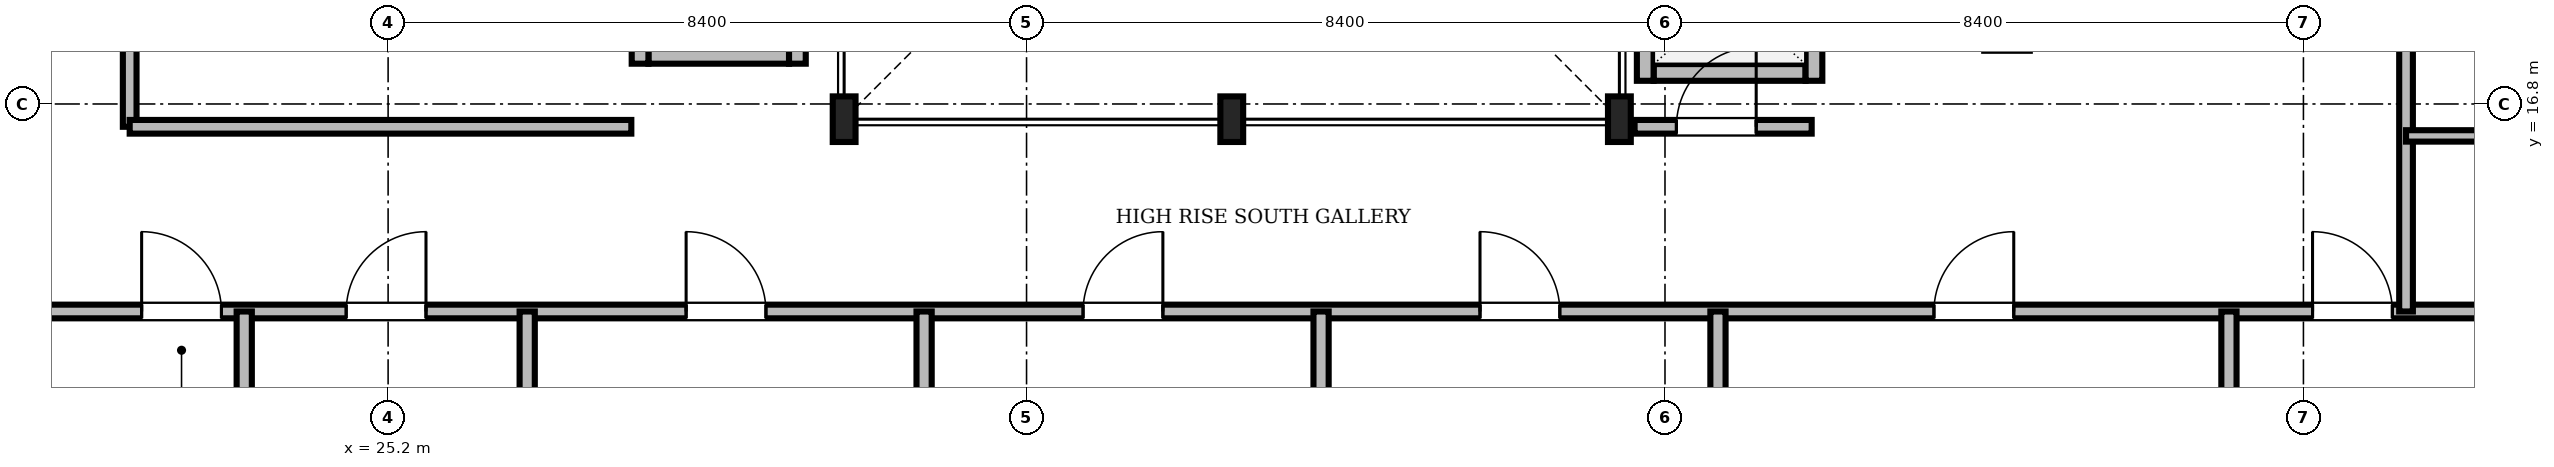
"""IFC4 building model, lengths in metres.
Left out: names, types, materials, properties, quantities, classifications, styles, units other than length and angle.
Written with IfcOpenShell. Run it as: python <this file> out.ifc"""

import sys

from ifc_helpers import new_model, si_unit, direction, frame, frame_2d, origin, origin_2d, place, context, subcontext, project, spatial, rectangle, i_section, extrude, source, transform, mapped, element, fill, save


model = new_model("IFC4")
c1 = context("Model", 3, precision=1e-05, world=origin(), true_north=direction((0.0, 1.0)))
c2 = subcontext(c1, "Body", "Model", "MODEL_VIEW")
j1 = project(units=[si_unit("LENGTHUNIT", "METRE"), si_unit("PLANEANGLEUNIT", "RADIAN")], contexts=[c1])
p1 = place(None, origin())
s1 = spatial("IfcSite", under=j1, at=p1, CompositionType="ELEMENT")
p2 = place(p1, origin())
s2 = spatial("IfcBuilding", under=s1, at=p2, CompositionType="ELEMENT")
p3 = place(p2, frame((0.0, 0.0, 262.45)))
s3 = spatial("IfcBuildingStorey", under=s2, at=p3, CompositionType="ELEMENT", Elevation=262.45)
m1 = source(origin(), c2, "Body", "SweptSolid", [
    extrude(i_section(OverallWidth=0.3, OverallDepth=0.6, WebThickness=0.015, FlangeThickness=0.03, FilletRadius=0.027, at=origin_2d()), origin(), (0.0, 0.0, 1.0), 3.65),
])
for number, where, z_axis, x_axis in (
    (1, (31.2, 16.6, 0.0), (0.0, 0.0, 1.0), (1.0, 0.0, 0.0)),
    (2, (36.3, 16.6, 0.0), (0.0, 0.0, 1.0), (1.0, 0.0, 0.0)),
    (3, (41.4, 16.6, 0.0), (0.0, 0.0, 1.0), (1.0, 0.0, 0.0)),
):
    element("IfcColumn", number, at=place(p3, frame(where, z_axis=z_axis, x_axis=x_axis)), inside=s3, PredefinedType="COLUMN", context=c2, shape_type="MappedRepresentation", body=[
        mapped(m1, transform((0.0, 0.0, 0.0), scale=1.0)),
    ])
m2 = source(origin(), c2, "Body", "SweptSolid", [
    extrude(rectangle(XDim=2.0, YDim=0.22, at=frame_2d((1.0, 0.0))), origin(), (0.0, 0.0, 1.0), 3.65),
])
p4 = place(p3, frame((41.85, 17.215, 0.0), z_axis=(0.0, 0.0, 1.0), x_axis=(1.0, 0.0, 0.0)))
e4 = element("IfcWall", 4, at=p4, inside=s3, PredefinedType="SOLIDWALL", context=c2, shape_type="MappedRepresentation", body=[
    mapped(m2, transform((0.0, 0.0, 0.0), scale=1.0)),
])
m3 = source(origin(), c2, "Body", "SweptSolid", [
    extrude(rectangle(XDim=2.19, YDim=0.22, at=frame_2d((1.095, 0.0))), origin(), (0.0, 0.0, 1.0), 3.65),
])
p5 = place(p3, frame((41.74, 17.105, 0.0), z_axis=(0.0, 0.0, 1.0), x_axis=(0.0, 1.0, 0.0)))
e5 = element("IfcWall", 5, at=p5, inside=s3, PredefinedType="SOLIDWALL", context=c2, shape_type="MappedRepresentation", body=[
    mapped(m3, transform((0.0, 0.0, 0.0), scale=1.0)),
])
p6 = place(p3, frame((43.96, 17.105, 0.0), z_axis=(0.0, 0.0, 1.0), x_axis=(0.0, 1.0, 0.0)))
e6 = element("IfcWall", 6, at=p6, inside=s3, PredefinedType="SOLIDWALL", context=c2, shape_type="MappedRepresentation", body=[
    mapped(m3, transform((0.0, 0.0, 0.0), scale=1.0)),
])
m4 = source(origin(), c2, "Body", "SweptSolid", [
    extrude(rectangle(XDim=1.1, YDim=2.2, at=frame_2d((0.55, 1.1))), frame((0.0, 0.12, 0.0), z_axis=(0.0, -1.0, 0.0), x_axis=(1.0, 0.0, 0.0)), (0.0, 0.0, 1.0), 0.24),
])
p7 = place(p6, frame((0.545, 0.0, 0.0)))
e7 = element("IfcOpeningElement", 7, at=p7, cuts=e6, PredefinedType="OPENING", context=c2, shape_type="MappedRepresentation", body=[
    mapped(m4, transform((0.0, 0.0, 0.0), scale=1.0)),
])
m5 = source(origin(), c2, "Body", "SweptSolid", [
    extrude(rectangle(XDim=1.85, YDim=0.22, at=frame_2d((0.925, 0.0))), origin(), (0.0, 0.0, 1.0), 3.65),
])
p8 = place(p3, frame((28.625, 17.44, 0.0), z_axis=(0.0, 0.0, 1.0), x_axis=(1.0, 0.0, 0.0)))
e8 = element("IfcWall", 8, at=p8, inside=s3, PredefinedType="SOLIDWALL", context=c2, shape_type="MappedRepresentation", body=[
    mapped(m5, transform((0.0, 0.0, 0.0), scale=1.0)),
])
m6 = source(origin(), c2, "Body", "SweptSolid", [
    extrude(rectangle(XDim=2.54, YDim=0.22, at=frame_2d((1.27, 0.0))), origin(), (0.0, 0.0, 1.0), 3.65),
])
for number, where, z_axis, x_axis in (
    (9, (28.515, 17.33, 0.0), (0.0, 0.0, 1.0), (0.0, 1.0, 0.0)),
    (10, (30.585, 17.33, 0.0), (0.0, 0.0, 1.0), (0.0, 1.0, 0.0)),
):
    element("IfcWall", number, at=place(p3, frame(where, z_axis=z_axis, x_axis=x_axis)), inside=s3, PredefinedType="SOLIDWALL", context=c2, shape_type="MappedRepresentation", body=[
        mapped(m6, transform((0.0, 0.0, 0.0), scale=1.0)),
    ])
m7 = source(origin(), c2, "Body", "SweptSolid", [
    extrude(rectangle(XDim=43.996, YDim=0.18, at=frame_2d((21.998, 0.0))), origin(), (0.0, 0.0, 1.0), 2.892),
])
p9 = place(p3, frame((17.002, 14.07, 0.0), z_axis=(0.0, 0.0, 1.0), x_axis=(1.0, 0.0, 0.0)))
e11 = element("IfcWall", 11, at=p9, inside=s3, PredefinedType="PARTITIONING", context=c2, shape_type="MappedRepresentation", body=[
    mapped(m7, transform((0.0, 0.0, 0.0), scale=1.0)),
])
m8 = source(origin(), c2, "Body", "SweptSolid", [
    extrude(rectangle(XDim=1.05, YDim=2.2, at=frame_2d((0.525, 1.1))), frame((0.0, 0.1, 0.0), z_axis=(0.0, -1.0, 0.0), x_axis=(1.0, 0.0, 0.0)), (0.0, 0.0, 1.0), 0.2),
])
p10 = place(p9, frame((4.955, 0.0, 0.0)))
e12 = element("IfcOpeningElement", 12, at=p10, cuts=e11, PredefinedType="OPENING", context=c2, shape_type="MappedRepresentation", body=[
    mapped(m8, transform((0.0, 0.0, 0.0), scale=1.0)),
])
p11 = place(p9, frame((7.646, 0.0, 0.0)))
e13 = element("IfcOpeningElement", 13, at=p11, cuts=e11, PredefinedType="OPENING", context=c2, shape_type="MappedRepresentation", body=[
    mapped(m8, transform((0.0, 0.0, 0.0), scale=1.0)),
])
p12 = place(p9, frame((12.119, 0.0, 0.0)))
e14 = element("IfcOpeningElement", 14, at=p12, cuts=e11, PredefinedType="OPENING", context=c2, shape_type="MappedRepresentation", body=[
    mapped(m8, transform((0.0, 0.0, 0.0), scale=1.0)),
])
p13 = place(p9, frame((17.342, 0.0, 0.0)))
e15 = element("IfcOpeningElement", 15, at=p13, cuts=e11, PredefinedType="OPENING", context=c2, shape_type="MappedRepresentation", body=[
    mapped(m8, transform((0.0, 0.0, 0.0), scale=1.0)),
])
p14 = place(p9, frame((22.564, 0.0, 0.0)))
e16 = element("IfcOpeningElement", 16, at=p14, cuts=e11, PredefinedType="OPENING", context=c2, shape_type="MappedRepresentation", body=[
    mapped(m8, transform((0.0, 0.0, 0.0), scale=1.0)),
])
p15 = place(p9, frame((28.537, 0.0, 0.0)))
e17 = element("IfcOpeningElement", 17, at=p15, cuts=e11, PredefinedType="OPENING", context=c2, shape_type="MappedRepresentation", body=[
    mapped(m8, transform((0.0, 0.0, 0.0), scale=1.0)),
])
p16 = place(p9, frame((33.518, 0.0, 0.0)))
e18 = element("IfcOpeningElement", 18, at=p16, cuts=e11, PredefinedType="OPENING", context=c2, shape_type="MappedRepresentation", body=[
    mapped(m8, transform((0.0, 0.0, 0.0), scale=1.0)),
])
m9 = source(origin(), c2, "Body", "SweptSolid", [
    extrude(rectangle(XDim=27.03, YDim=0.18, at=frame_2d((13.515, 0.0))), origin(), (0.0, 0.0, 1.0), 3.092),
])
p17 = place(p3, frame((51.75, 14.07, 0.0), z_axis=(0.0, 0.0, 1.0), x_axis=(0.0, 1.0, 0.0)))
e19 = element("IfcWall", 19, at=p17, inside=s3, PredefinedType="PARTITIONING", context=c2, shape_type="MappedRepresentation", body=[
    mapped(m9, transform((0.0, 0.0, 0.0), scale=1.0)),
])
p18 = place(p17, frame((5.133, 0.0, 0.0)))
e20 = element("IfcOpeningElement", 20, at=p18, cuts=e19, PredefinedType="OPENING", context=c2, shape_type="MappedRepresentation", body=[
    mapped(m8, transform((0.0, 0.0, 0.0), scale=1.0)),
])
p19 = place(p17, frame((14.07, 0.0, 0.0)))
e21 = element("IfcOpeningElement", 21, at=p19, cuts=e19, PredefinedType="OPENING", context=c2, shape_type="MappedRepresentation", body=[
    mapped(m8, transform((0.0, 0.0, 0.0), scale=1.0)),
])
p20 = place(p17, frame((23.007, 0.0, 0.0)))
e22 = element("IfcOpeningElement", 22, at=p20, cuts=e19, PredefinedType="OPENING", context=c2, shape_type="MappedRepresentation", body=[
    mapped(m8, transform((0.0, 0.0, 0.0), scale=1.0)),
])
m10 = source(origin(), c2, "Body", "SweptSolid", [
    extrude(rectangle(XDim=5.4, YDim=0.18, at=frame_2d((2.7, 0.0))), origin(), (0.0, 0.0, 1.0), 3.65),
])
p21 = place(p3, frame((21.8, 16.5, 0.0), z_axis=(0.0, 0.0, 1.0), x_axis=(0.0, 1.0, 0.0)))
e23 = element("IfcWall", 23, at=p21, inside=s3, PredefinedType="PARTITIONING", context=c2, shape_type="MappedRepresentation", body=[
    mapped(m10, transform((0.0, 0.0, 0.0), scale=1.0)),
])
p22 = place(p21, frame((2.0, 0.0, 0.0)))
e24 = element("IfcOpeningElement", 24, at=p22, cuts=e23, PredefinedType="OPENING", context=c2, shape_type="MappedRepresentation", body=[
    mapped(m8, transform((0.0, 0.0, 0.0), scale=1.0)),
])
m11 = source(origin(), c2, "Body", "SweptSolid", [
    extrude(rectangle(XDim=2.33, YDim=0.18, at=frame_2d((1.165, 0.0))), origin(), (0.0, 0.0, 1.0), 3.092),
])
p23 = place(p3, frame((41.6, 16.5, 0.0), z_axis=(0.0, 0.0, 1.0), x_axis=(1.0, 0.0, 0.0)))
e25 = element("IfcWall", 25, at=p23, inside=s3, PredefinedType="PARTITIONING", context=c2, shape_type="MappedRepresentation", body=[
    mapped(m11, transform((0.0, 0.0, 0.0), scale=1.0)),
])
p24 = place(p23, frame((0.55, 0.0, 0.0)))
e26 = element("IfcOpeningElement", 26, at=p24, cuts=e25, PredefinedType="OPENING", context=c2, shape_type="MappedRepresentation", body=[
    mapped(m8, transform((0.0, 0.0, 0.0), scale=1.0)),
])
m12 = source(origin(), c2, "Body", "SweptSolid", [
    extrude(rectangle(XDim=10.868, YDim=0.2, at=frame_2d((5.434, 0.0))), origin(), (0.0, 0.0, 1.0), 2.892),
])
for number, where, z_axis, x_axis in (
    (27, (23.307, 3.202, 0.0), (0.0, 0.0, 1.0), (0.0, 1.0, 0.0)),
    (28, (27.03, 3.202, 0.0), (0.0, 0.0, 1.0), (0.0, 1.0, 0.0)),
    (29, (32.252, 3.202, 0.0), (0.0, 0.0, 1.0), (0.0, 1.0, 0.0)),
):
    element("IfcWall", number, at=place(p3, frame(where, z_axis=z_axis, x_axis=x_axis)), inside=s3, PredefinedType="PARTITIONING", context=c2, shape_type="MappedRepresentation", body=[
        mapped(m12, transform((0.0, 0.0, 0.0), scale=1.0)),
    ])
m13 = source(origin(), c2, "Body", "SweptSolid", [
    extrude(rectangle(XDim=11.06, YDim=0.2, at=frame_2d((5.53, 0.0))), origin(), (0.0, 0.0, 1.0), 2.892),
])
p25 = place(p3, frame((37.475, 3.01, 0.0), z_axis=(0.0, 0.0, 1.0), x_axis=(0.0, 1.0, 0.0)))
e30 = element("IfcWall", 30, at=p25, inside=s3, PredefinedType="PARTITIONING", context=c2, shape_type="MappedRepresentation", body=[
    mapped(m13, transform((0.0, 0.0, 0.0), scale=1.0)),
])
for number, where, z_axis, x_axis in (
    (31, (42.697, 3.202, 0.0), (0.0, 0.0, 1.0), (0.0, 1.0, 0.0)),
    (32, (49.42, 3.202, 0.0), (0.0, 0.0, 1.0), (0.0, 1.0, 0.0)),
):
    element("IfcWall", number, at=place(p3, frame(where, z_axis=z_axis, x_axis=x_axis)), inside=s3, PredefinedType="PARTITIONING", context=c2, shape_type="MappedRepresentation", body=[
        mapped(m12, transform((0.0, 0.0, 0.0), scale=1.0)),
    ])
m14 = source(origin(), c2, "Body", "SweptSolid", [
    extrude(rectangle(XDim=6.6, YDim=0.18, at=frame_2d((3.3, 0.0))), origin(), (0.0, 0.0, 1.0), 3.65),
])
p26 = place(p3, frame((21.8, 16.5, 0.0), z_axis=(0.0, 0.0, 1.0), x_axis=(1.0, 0.0, 0.0)))
e33 = element("IfcWall", 33, at=p26, inside=s3, PredefinedType="PARTITIONING", context=c2, shape_type="MappedRepresentation", body=[
    mapped(m14, transform((0.0, 0.0, 0.0), scale=1.0)),
])
m15 = source(origin(), c2, "Body", "SweptSolid", [
    extrude(rectangle(XDim=2.36, YDim=0.15, at=frame_2d((1.18, 0.0))), origin(), (0.0, 0.0, 1.0), 3.65),
])
p27 = place(p3, frame((51.75, 16.38, 0.0), z_axis=(0.0, 0.0, 1.0), x_axis=(1.0, 0.0, 0.0)))
e34 = element("IfcWall", 34, at=p27, inside=s3, PredefinedType="PARTITIONING", context=c2, shape_type="MappedRepresentation", body=[
    mapped(m15, transform((0.0, 0.0, 0.0), scale=1.0)),
])
m16 = source(origin(), c2, "Body", "SweptSolid", [
    extrude(rectangle(XDim=1.05, YDim=2.2, at=frame_2d((0.525, 1.1))), frame((0.0, 0.025, 0.0), z_axis=(0.0, -1.0, 0.0), x_axis=(1.0, 0.0, 0.0)), (0.0, 0.0, 1.0), 0.05),
])
p28 = place(p10, origin())
e35 = element("IfcDoor", 35, at=p28, inside=s3, OperationType="SINGLE_SWING_LEFT", PredefinedType="DOOR", context=c2, shape_type="MappedRepresentation", body=[
    mapped(m16, transform((0.0, 0.0, 0.0), scale=1.0)),
])
fill(e12, e35)
p29 = place(p11, origin())
e36 = element("IfcDoor", 36, at=p29, inside=s3, OperationType="SINGLE_SWING_RIGHT", PredefinedType="DOOR", context=c2, shape_type="MappedRepresentation", body=[
    mapped(m16, transform((0.0, 0.0, 0.0), scale=1.0)),
])
fill(e13, e36)
p30 = place(p12, origin())
e37 = element("IfcDoor", 37, at=p30, inside=s3, OperationType="SINGLE_SWING_LEFT", PredefinedType="DOOR", context=c2, shape_type="MappedRepresentation", body=[
    mapped(m16, transform((0.0, 0.0, 0.0), scale=1.0)),
])
fill(e14, e37)
p31 = place(p13, origin())
e38 = element("IfcDoor", 38, at=p31, inside=s3, OperationType="SINGLE_SWING_RIGHT", PredefinedType="DOOR", context=c2, shape_type="MappedRepresentation", body=[
    mapped(m16, transform((0.0, 0.0, 0.0), scale=1.0)),
])
fill(e15, e38)
p32 = place(p14, origin())
e39 = element("IfcDoor", 39, at=p32, inside=s3, OperationType="SINGLE_SWING_LEFT", PredefinedType="DOOR", context=c2, shape_type="MappedRepresentation", body=[
    mapped(m16, transform((0.0, 0.0, 0.0), scale=1.0)),
])
fill(e16, e39)
p33 = place(p15, origin())
e40 = element("IfcDoor", 40, at=p33, inside=s3, OperationType="SINGLE_SWING_RIGHT", PredefinedType="DOOR", context=c2, shape_type="MappedRepresentation", body=[
    mapped(m16, transform((0.0, 0.0, 0.0), scale=1.0)),
])
fill(e17, e40)
p34 = place(p16, origin())
e41 = element("IfcDoor", 41, at=p34, inside=s3, OperationType="SINGLE_SWING_LEFT", PredefinedType="DOOR", context=c2, shape_type="MappedRepresentation", body=[
    mapped(m16, transform((0.0, 0.0, 0.0), scale=1.0)),
])
fill(e18, e41)
p35 = place(p24, origin())
e42 = element("IfcDoor", 42, at=p35, inside=s3, OperationType="SINGLE_SWING_RIGHT", PredefinedType="DOOR", context=c2, shape_type="MappedRepresentation", body=[
    mapped(m16, transform((0.0, 0.0, 0.0), scale=1.0)),
])
fill(e26, e42)
save(model, sys.argv[1])
